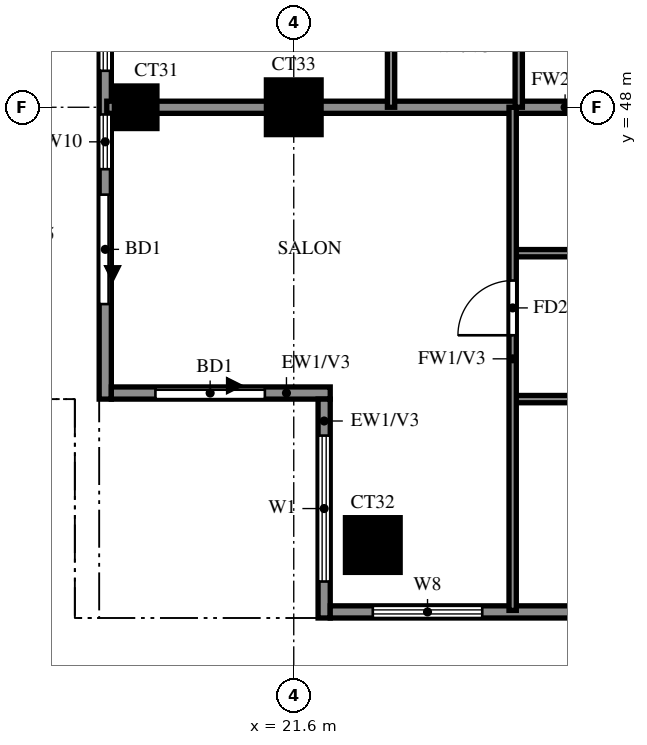
"""IFC4 building model, lengths in metres.
Left out: names, types, materials, properties, quantities, classifications, styles, units other than length and angle.
Written with IfcOpenShell. Run it as: python <this file> out.ifc"""

import sys

from ifc_helpers import new_model, si_unit, direction, frame, frame_2d, origin, origin_2d, place, context, subcontext, project, spatial, rectangle, extrude, source, transform, mapped, element, fill, save


model = new_model("IFC4")
c1 = context("Model", 3, precision=1e-05, world=origin(), true_north=direction((0.0, 1.0)))
c2 = subcontext(c1, "Body", "Model", "MODEL_VIEW")
j1 = project(units=[si_unit("LENGTHUNIT", "METRE"), si_unit("PLANEANGLEUNIT", "RADIAN")], contexts=[c1])
p1 = place(None, origin())
s1 = spatial("IfcSite", under=j1, at=p1, CompositionType="ELEMENT")
p2 = place(p1, origin())
s2 = spatial("IfcBuilding", under=s1, at=p2, CompositionType="ELEMENT")
p3 = place(p2, frame((0.0, 0.0, 211.5)))
s3 = spatial("IfcBuildingStorey", under=s2, at=p3, CompositionType="ELEMENT", Elevation=211.5)
m1 = source(origin(), c2, "Body", "SweptSolid", [
    extrude(rectangle(XDim=0.9, YDim=0.9, at=origin_2d()), origin(), (0.0, 0.0, 1.0), 3.5),
])
p4 = place(p3, frame((22.9, 40.8, -0.28), z_axis=(0.0, 0.0, 1.0), x_axis=(1.0, 0.0, 0.0)))
e1 = element("IfcColumn", 1, at=p4, inside=s3, PredefinedType="COLUMN", context=c2, shape_type="MappedRepresentation", body=[
    mapped(m1, transform((0.0, 0.0, 0.0))),
])
m2 = source(origin(), c2, "Body", "SweptSolid", [
    extrude(rectangle(XDim=0.7, YDim=0.7, at=origin_2d()), origin(), (0.0, 0.0, 1.0), 3.5),
])
p5 = place(p3, frame((19.0, 48.0, -0.28), z_axis=(0.0, 0.0, 1.0), x_axis=(1.0, 0.0, 0.0)))
e2 = element("IfcColumn", 2, at=p5, inside=s3, PredefinedType="COLUMN", context=c2, shape_type="MappedRepresentation", body=[
    mapped(m2, transform((0.0, 0.0, 0.0))),
])
m3 = source(origin(), c2, "Body", "SweptSolid", [
    extrude(rectangle(XDim=0.9, YDim=0.9, at=origin_2d()), origin(), (0.0, 0.0, 1.0), 3.22),
])
p6 = place(p3, frame((21.6, 48.0, 0.0), z_axis=(0.0, 0.0, 1.0), x_axis=(1.0, 0.0, 0.0)))
e3 = element("IfcColumn", 3, at=p6, inside=s3, PredefinedType="COLUMN", context=c2, shape_type="MappedRepresentation", body=[
    mapped(m3, transform((0.0, 0.0, 0.0))),
])
p7 = place(p3, frame((18.5, 76.6, 0.0), z_axis=(0.0, 0.0, 1.0), x_axis=(0.0, -1.0, 0.0)))
e4 = element("IfcWall", 4, at=p7, inside=s3, PredefinedType="SOLIDWALL", context=c2, shape_type="SweptSolid", body=[
    extrude(rectangle(XDim=33.4, YDim=0.2, at=frame_2d((16.7, 0.0))), origin(), (0.0, 0.0, 1.0), 3.22),
])
p8 = place(p7, frame((30.037, 0.0, 0.0)))
e5 = element("IfcOpeningElement", 5, at=p8, cuts=e4, PredefinedType="OPENING", context=c2, shape_type="SweptSolid", body=[
    extrude(rectangle(XDim=1.8, YDim=2.4, at=frame_2d((0.9, 1.2))), frame((0.0, 0.11, 0.0), z_axis=(0.0, -1.0, 0.0), x_axis=(1.0, 0.0, 0.0)), (0.0, 0.0, 1.0), 0.22),
])
p9 = place(p7, frame((28.719, 0.0, 0.6)))
e6 = element("IfcOpeningElement", 6, at=p9, cuts=e4, PredefinedType="OPENING", context=c2, shape_type="SweptSolid", body=[
    extrude(rectangle(XDim=0.9, YDim=2.4, at=frame_2d((0.45, 1.2))), frame((0.0, 0.11, 0.0), z_axis=(0.0, -1.0, 0.0), x_axis=(1.0, 0.0, 0.0)), (0.0, 0.0, 1.0), 0.22),
])
p10 = place(p7, frame((25.6, 0.0, 0.6)))
e7 = element("IfcOpeningElement", 7, at=p10, cuts=e4, PredefinedType="OPENING", context=c2, shape_type="SweptSolid", body=[
    extrude(rectangle(XDim=2.4, YDim=2.4, at=frame_2d((1.2, 1.2))), frame((0.0, 0.11, 0.0), z_axis=(0.0, -1.0, 0.0), x_axis=(1.0, 0.0, 0.0)), (0.0, 0.0, 1.0), 0.22),
])
p11 = place(p7, frame((22.0, 0.0, 0.6)))
e8 = element("IfcOpeningElement", 8, at=p11, cuts=e4, PredefinedType="OPENING", context=c2, shape_type="SweptSolid", body=[
    extrude(rectangle(XDim=2.4, YDim=2.4, at=frame_2d((1.2, 1.2))), frame((0.0, 0.11, 0.0), z_axis=(0.0, -1.0, 0.0), x_axis=(1.0, 0.0, 0.0)), (0.0, 0.0, 1.0), 0.22),
])
p12 = place(p7, frame((18.4, 0.0, 0.6)))
e9 = element("IfcOpeningElement", 9, at=p12, cuts=e4, PredefinedType="OPENING", context=c2, shape_type="SweptSolid", body=[
    extrude(rectangle(XDim=2.4, YDim=2.4, at=frame_2d((1.2, 1.2))), frame((0.0, 0.11, 0.0), z_axis=(0.0, -1.0, 0.0), x_axis=(1.0, 0.0, 0.0)), (0.0, 0.0, 1.0), 0.22),
])
p13 = place(p7, frame((14.8, 0.0, 0.6)))
e10 = element("IfcOpeningElement", 10, at=p13, cuts=e4, PredefinedType="OPENING", context=c2, shape_type="SweptSolid", body=[
    extrude(rectangle(XDim=2.4, YDim=2.4, at=frame_2d((1.2, 1.2))), frame((0.0, 0.11, 0.0), z_axis=(0.0, -1.0, 0.0), x_axis=(1.0, 0.0, 0.0)), (0.0, 0.0, 1.0), 0.22),
])
p14 = place(p7, frame((7.833, 0.0, 0.6)))
e11 = element("IfcOpeningElement", 11, at=p14, cuts=e4, PredefinedType="OPENING", context=c2, shape_type="SweptSolid", body=[
    extrude(rectangle(XDim=2.4, YDim=2.4, at=frame_2d((1.2, 1.2))), frame((0.0, 0.11, 0.0), z_axis=(0.0, -1.0, 0.0), x_axis=(1.0, 0.0, 0.0)), (0.0, 0.0, 1.0), 0.22),
])
p15 = place(p7, frame((10.967, 0.0, 0.6)))
e12 = element("IfcOpeningElement", 12, at=p15, cuts=e4, PredefinedType="OPENING", context=c2, shape_type="SweptSolid", body=[
    extrude(rectangle(XDim=2.4, YDim=2.4, at=frame_2d((1.2, 1.2))), frame((0.0, 0.11, 0.0), z_axis=(0.0, -1.0, 0.0), x_axis=(1.0, 0.0, 0.0)), (0.0, 0.0, 1.0), 0.22),
])
p16 = place(p7, frame((4.75, 0.0, 1.5)))
e13 = element("IfcOpeningElement", 13, at=p16, cuts=e4, PredefinedType="OPENING", context=c2, shape_type="SweptSolid", body=[
    extrude(rectangle(XDim=0.9, YDim=0.9, at=frame_2d((0.45, 0.45))), frame((0.0, 0.11, 0.0), z_axis=(0.0, -1.0, 0.0), x_axis=(1.0, 0.0, 0.0)), (0.0, 0.0, 1.0), 0.22),
])
p17 = place(p7, frame((0.6, 0.0, 0.6)))
e14 = element("IfcOpeningElement", 14, at=p17, cuts=e4, PredefinedType="OPENING", context=c2, shape_type="SweptSolid", body=[
    extrude(rectangle(XDim=2.4, YDim=2.4, at=frame_2d((1.2, 1.2))), frame((0.0, 0.11, 0.0), z_axis=(0.0, -1.0, 0.0), x_axis=(1.0, 0.0, 0.0)), (0.0, 0.0, 1.0), 0.22),
])
p18 = place(p3, frame((18.6, 43.3, 0.0), z_axis=(0.0, 0.0, 1.0), x_axis=(1.0, 0.0, 0.0)))
e15 = element("IfcWall", 15, at=p18, inside=s3, PredefinedType="SOLIDWALL", context=c2, shape_type="SweptSolid", body=[
    extrude(rectangle(XDim=3.6, YDim=0.2, at=frame_2d((1.8, 0.0))), origin(), (0.0, 0.0, 1.0), 3.22),
])
p19 = place(p18, frame((0.725, 0.0, 0.0)))
e16 = element("IfcOpeningElement", 16, at=p19, cuts=e15, PredefinedType="OPENING", context=c2, shape_type="SweptSolid", body=[
    extrude(rectangle(XDim=1.8, YDim=2.4, at=frame_2d((0.9, 1.2))), frame((0.0, 0.11, 0.0), z_axis=(0.0, -1.0, 0.0), x_axis=(1.0, 0.0, 0.0)), (0.0, 0.0, 1.0), 0.22),
])
p20 = place(p3, frame((22.1, 43.2, 0.0), z_axis=(0.0, 0.0, 1.0), x_axis=(0.0, -1.0, 0.0)))
e17 = element("IfcWall", 17, at=p20, inside=s3, PredefinedType="SOLIDWALL", context=c2, shape_type="SweptSolid", body=[
    extrude(rectangle(XDim=3.6, YDim=0.2, at=frame_2d((1.8, 0.0))), origin(), (0.0, 0.0, 1.0), 3.22),
])
p21 = place(p20, frame((0.6, 0.0, 0.6)))
e18 = element("IfcOpeningElement", 18, at=p21, cuts=e17, PredefinedType="OPENING", context=c2, shape_type="SweptSolid", body=[
    extrude(rectangle(XDim=2.4, YDim=2.4, at=frame_2d((1.2, 1.2))), frame((0.0, 0.11, 0.0), z_axis=(0.0, -1.0, 0.0), x_axis=(1.0, 0.0, 0.0)), (0.0, 0.0, 1.0), 0.22),
])
p22 = place(p3, frame((22.2, 39.7, 0.0), z_axis=(0.0, 0.0, 1.0), x_axis=(1.0, 0.0, 0.0)))
e19 = element("IfcWall", 19, at=p22, inside=s3, PredefinedType="SOLIDWALL", context=c2, shape_type="SweptSolid", body=[
    extrude(rectangle(XDim=19.8, YDim=0.2, at=frame_2d((9.9, 0.0))), origin(), (0.0, 0.0, 1.0), 3.22),
])
p23 = place(p22, frame((0.7, 0.0, 0.6)))
e20 = element("IfcOpeningElement", 20, at=p23, cuts=e19, PredefinedType="OPENING", context=c2, shape_type="SweptSolid", body=[
    extrude(rectangle(XDim=1.8, YDim=2.4, at=frame_2d((0.9, 1.2))), frame((0.0, 0.11, 0.0), z_axis=(0.0, -1.0, 0.0), x_axis=(1.0, 0.0, 0.0)), (0.0, 0.0, 1.0), 0.22),
])
p24 = place(p22, frame((7.8, 0.0, 0.6)))
e21 = element("IfcOpeningElement", 21, at=p24, cuts=e19, PredefinedType="OPENING", context=c2, shape_type="SweptSolid", body=[
    extrude(rectangle(XDim=2.4, YDim=2.4, at=frame_2d((1.2, 1.2))), frame((0.0, 0.11, 0.0), z_axis=(0.0, -1.0, 0.0), x_axis=(1.0, 0.0, 0.0)), (0.0, 0.0, 1.0), 0.22),
])
p25 = place(p22, frame((4.35, 0.0, 1.5)))
e22 = element("IfcOpeningElement", 22, at=p25, cuts=e19, PredefinedType="OPENING", context=c2, shape_type="SweptSolid", body=[
    extrude(rectangle(XDim=0.9, YDim=0.9, at=frame_2d((0.45, 0.45))), frame((0.0, 0.11, 0.0), z_axis=(0.0, -1.0, 0.0), x_axis=(1.0, 0.0, 0.0)), (0.0, 0.0, 1.0), 0.22),
])
p26 = place(p3, frame((18.525, 48.0, 0.0), z_axis=(0.0, 0.0, 1.0), x_axis=(1.0, 0.0, 0.0)))
e23 = element("IfcWall", 23, at=p26, inside=s3, PredefinedType="SOLIDWALL", context=c2, shape_type="SweptSolid", body=[
    extrude(rectangle(XDim=15.075, YDim=0.2, at=frame_2d((7.538, 0.0))), origin(), (0.0, 0.0, 1.0), 3.22),
])
p27 = place(p3, frame((25.2, 43.2, 0.0), z_axis=(0.0, 0.0, 1.0), x_axis=(1.0, 0.0, 0.0)))
e24 = element("IfcWall", 24, at=p27, inside=s3, PredefinedType="PARTITIONING", context=c2, shape_type="SweptSolid", body=[
    extrude(rectangle(XDim=3.6, YDim=0.12, at=frame_2d((1.8, 0.0))), origin(), (0.0, 0.0, 1.0), 3.22),
])
p28 = place(p3, frame((25.2, 45.6, 0.0), z_axis=(0.0, 0.0, 1.0), x_axis=(1.0, 0.0, 0.0)))
e25 = element("IfcWall", 25, at=p28, inside=s3, PredefinedType="PARTITIONING", context=c2, shape_type="SweptSolid", body=[
    extrude(rectangle(XDim=6.0, YDim=0.12, at=frame_2d((3.0, 0.0))), origin(), (0.0, 0.0, 1.0), 3.22),
])
p29 = place(p28, frame((2.55, 0.0, 0.0)))
e26 = element("IfcOpeningElement", 26, at=p29, cuts=e25, PredefinedType="OPENING", context=c2, shape_type="SweptSolid", body=[
    extrude(rectangle(XDim=0.9, YDim=2.1, at=frame_2d((0.45, 1.05))), frame((0.0, 0.07, 0.0), z_axis=(0.0, -1.0, 0.0), x_axis=(1.0, 0.0, 0.0)), (0.0, 0.0, 1.0), 0.14),
])
p30 = place(p3, frame((23.2, 48.0, 0.0), z_axis=(0.0, 0.0, 1.0), x_axis=(0.0, 1.0, 0.0)))
e27 = element("IfcWall", 27, at=p30, inside=s3, PredefinedType="PARTITIONING", context=c2, shape_type="SweptSolid", body=[
    extrude(rectangle(XDim=21.6, YDim=0.12, at=frame_2d((10.8, 0.0))), origin(), (0.0, 0.0, 1.0), 3.22),
])
p31 = place(p30, frame((1.35, 0.0, 0.0)))
e28 = element("IfcOpeningElement", 28, at=p31, cuts=e27, PredefinedType="OPENING", context=c2, shape_type="SweptSolid", body=[
    extrude(rectangle(XDim=0.9, YDim=2.1, at=frame_2d((0.45, 1.05))), frame((0.0, 0.07, 0.0), z_axis=(0.0, -1.0, 0.0), x_axis=(1.0, 0.0, 0.0)), (0.0, 0.0, 1.0), 0.14),
])
p32 = place(p30, frame((4.95, 0.0, 0.0)))
e29 = element("IfcOpeningElement", 29, at=p32, cuts=e27, PredefinedType="OPENING", context=c2, shape_type="SweptSolid", body=[
    extrude(rectangle(XDim=0.9, YDim=2.1, at=frame_2d((0.45, 1.05))), frame((0.0, 0.07, 0.0), z_axis=(0.0, -1.0, 0.0), x_axis=(1.0, 0.0, 0.0)), (0.0, 0.0, 1.0), 0.14),
])
p33 = place(p30, frame((8.25, 0.0, 0.0)))
e30 = element("IfcOpeningElement", 30, at=p33, cuts=e27, PredefinedType="OPENING", context=c2, shape_type="SweptSolid", body=[
    extrude(rectangle(XDim=1.5, YDim=2.1, at=frame_2d((0.75, 1.05))), frame((0.0, 0.07, 0.0), z_axis=(0.0, -1.0, 0.0), x_axis=(1.0, 0.0, 0.0)), (0.0, 0.0, 1.0), 0.14),
])
p34 = place(p30, frame((12.15, 0.0, 0.0)))
e31 = element("IfcOpeningElement", 31, at=p34, cuts=e27, PredefinedType="OPENING", context=c2, shape_type="SweptSolid", body=[
    extrude(rectangle(XDim=0.9, YDim=2.1, at=frame_2d((0.45, 1.05))), frame((0.0, 0.07, 0.0), z_axis=(0.0, -1.0, 0.0), x_axis=(1.0, 0.0, 0.0)), (0.0, 0.0, 1.0), 0.14),
])
p35 = place(p30, frame((17.55, 0.0, 0.0)))
e32 = element("IfcOpeningElement", 32, at=p35, cuts=e27, PredefinedType="OPENING", context=c2, shape_type="SweptSolid", body=[
    extrude(rectangle(XDim=0.9, YDim=2.1, at=frame_2d((0.45, 1.05))), frame((0.0, 0.07, 0.0), z_axis=(0.0, -1.0, 0.0), x_axis=(1.0, 0.0, 0.0)), (0.0, 0.0, 1.0), 0.14),
])
p36 = place(p3, frame((25.2, 39.725, 0.0), z_axis=(0.0, 0.0, 1.0), x_axis=(0.0, 1.0, 0.0)))
e33 = element("IfcWall", 33, at=p36, inside=s3, PredefinedType="PARTITIONING", context=c2, shape_type="SweptSolid", body=[
    extrude(rectangle(XDim=8.275, YDim=0.12, at=frame_2d((4.137, 0.0))), origin(), (0.0, 0.0, 1.0), 3.22),
])
p37 = place(p36, frame((4.525, 0.0, 0.0)))
e34 = element("IfcOpeningElement", 34, at=p37, cuts=e33, PredefinedType="OPENING", context=c2, shape_type="SweptSolid", body=[
    extrude(rectangle(XDim=0.9, YDim=2.1, at=frame_2d((0.45, 1.05))), frame((0.0, 0.07, 0.0), z_axis=(0.0, -1.0, 0.0), x_axis=(1.0, 0.0, 0.0)), (0.0, 0.0, 1.0), 0.14),
])
p38 = place(p3, frame((25.3, 48.0, 0.0), z_axis=(0.0, 0.0, 1.0), x_axis=(0.0, 1.0, 0.0)))
e35 = element("IfcWall", 35, at=p38, inside=s3, PredefinedType="PARTITIONING", context=c2, shape_type="SweptSolid", body=[
    extrude(rectangle(XDim=3.6, YDim=0.12, at=frame_2d((1.8, 0.0))), origin(), (0.0, 0.0, 1.0), 3.22),
])
p39 = place(p38, frame((1.35, 0.0, 0.0)))
e36 = element("IfcOpeningElement", 36, at=p39, cuts=e35, PredefinedType="OPENING", context=c2, shape_type="SweptSolid", body=[
    extrude(rectangle(XDim=0.9, YDim=2.1, at=frame_2d((0.45, 1.05))), frame((0.0, 0.07, 0.0), z_axis=(0.0, -1.0, 0.0), x_axis=(1.0, 0.0, 0.0)), (0.0, 0.0, 1.0), 0.14),
])
p40 = place(p8, origin())
e37 = element("IfcDoor", 37, at=p40, inside=s3, OperationType="DOUBLE_DOOR_SLIDING", PredefinedType="DOOR", context=c2, shape_type="SweptSolid", body=[
    extrude(rectangle(XDim=1.8, YDim=2.4, at=frame_2d((0.9, 1.2))), frame((0.0, 0.025, 0.0), z_axis=(0.0, -1.0, 0.0), x_axis=(1.0, 0.0, 0.0)), (0.0, 0.0, 1.0), 0.05),
])
fill(e5, e37)
p41 = place(p9, origin())
e38 = element("IfcWindow", 38, at=p41, inside=s3, PartitioningType="SINGLE_PANEL", PredefinedType="WINDOW", context=c2, shape_type="SweptSolid", body=[
    extrude(rectangle(XDim=0.9, YDim=2.4, at=frame_2d((0.45, 1.2))), frame((0.0, 0.03, 0.0), z_axis=(0.0, -1.0, 0.0), x_axis=(1.0, 0.0, 0.0)), (0.0, 0.0, 1.0), 0.06),
])
fill(e6, e38)
p42 = place(p10, origin())
e39 = element("IfcWindow", 39, at=p42, inside=s3, PartitioningType="DOUBLE_PANEL_VERTICAL", PredefinedType="WINDOW", context=c2, shape_type="SweptSolid", body=[
    extrude(rectangle(XDim=2.4, YDim=2.4, at=frame_2d((1.2, 1.2))), frame((0.0, 0.03, 0.0), z_axis=(0.0, -1.0, 0.0), x_axis=(1.0, 0.0, 0.0)), (0.0, 0.0, 1.0), 0.06),
])
fill(e7, e39)
p43 = place(p19, origin())
e40 = element("IfcDoor", 40, at=p43, inside=s3, OperationType="DOUBLE_DOOR_SLIDING", PredefinedType="DOOR", context=c2, shape_type="SweptSolid", body=[
    extrude(rectangle(XDim=1.8, YDim=2.4, at=frame_2d((0.9, 1.2))), frame((0.0, 0.025, 0.0), z_axis=(0.0, -1.0, 0.0), x_axis=(1.0, 0.0, 0.0)), (0.0, 0.0, 1.0), 0.05),
])
fill(e16, e40)
p44 = place(p21, origin())
e41 = element("IfcWindow", 41, at=p44, inside=s3, PartitioningType="DOUBLE_PANEL_VERTICAL", PredefinedType="WINDOW", context=c2, shape_type="SweptSolid", body=[
    extrude(rectangle(XDim=2.4, YDim=2.4, at=frame_2d((1.2, 1.2))), frame((0.0, 0.03, 0.0), z_axis=(0.0, -1.0, 0.0), x_axis=(1.0, 0.0, 0.0)), (0.0, 0.0, 1.0), 0.06),
])
fill(e18, e41)
p45 = place(p23, origin())
e42 = element("IfcWindow", 42, at=p45, inside=s3, PartitioningType="DOUBLE_PANEL_VERTICAL", PredefinedType="WINDOW", context=c2, shape_type="SweptSolid", body=[
    extrude(rectangle(XDim=1.8, YDim=2.4, at=frame_2d((0.9, 1.2))), frame((0.0, 0.03, 0.0), z_axis=(0.0, -1.0, 0.0), x_axis=(1.0, 0.0, 0.0)), (0.0, 0.0, 1.0), 0.06),
])
fill(e20, e42)
p46 = place(p37, origin())
e43 = element("IfcDoor", 43, at=p46, inside=s3, OperationType="SINGLE_SWING_RIGHT", PredefinedType="DOOR", context=c2, shape_type="SweptSolid", body=[
    extrude(rectangle(XDim=0.9, YDim=2.1, at=frame_2d((0.45, 1.05))), frame((0.0, 0.025, 0.0), z_axis=(0.0, -1.0, 0.0), x_axis=(1.0, 0.0, 0.0)), (0.0, 0.0, 1.0), 0.05),
])
fill(e34, e43)
save(model, sys.argv[1])
